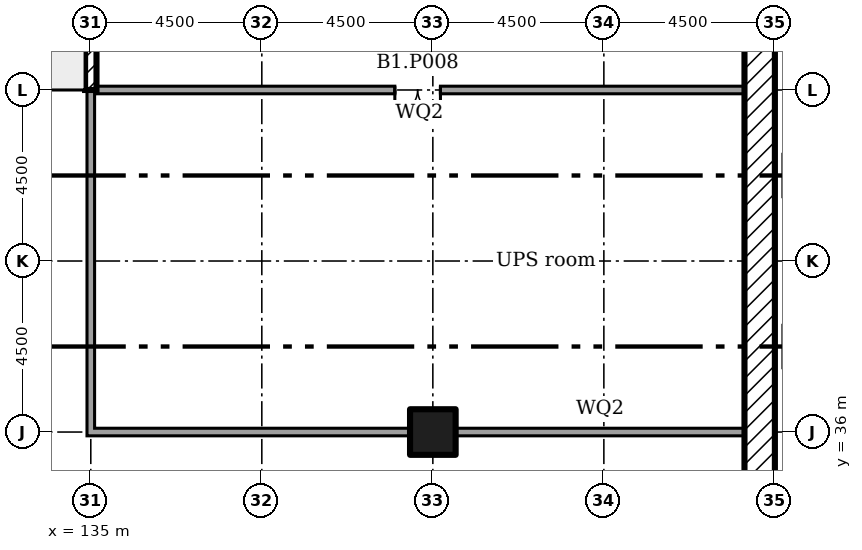
"""IFC4 building model, lengths in metres.
Left out: names, types, materials, properties, quantities, classifications, styles, units other than length and angle.
Written with IfcOpenShell. Run it as: python <this file> out.ifc"""

import sys

from ifc_helpers import new_model, si_unit, direction, frame, frame_2d, origin, origin_2d, place, context, subcontext, project, spatial, rectangle, extrude, element, fill, save


model = new_model("IFC4")
c1 = context("Model", 3, precision=1e-05, world=origin(), true_north=direction((0.0, 1.0)))
c2 = subcontext(c1, "Body", "Model", "MODEL_VIEW")
j1 = project(units=[si_unit("LENGTHUNIT", "METRE"), si_unit("PLANEANGLEUNIT", "RADIAN")], contexts=[c1])
p1 = place(None, origin())
s1 = spatial("IfcSite", under=j1, at=p1, CompositionType="ELEMENT")
p2 = place(p1, origin())
s2 = spatial("IfcBuilding", under=s1, at=p2, CompositionType="ELEMENT")
p3 = place(p2, frame((0.0, 0.0, -4.0)))
s3 = spatial("IfcBuildingStorey", under=s2, at=p3, CompositionType="ELEMENT", Elevation=-4.0)
p4 = place(p3, frame((144.0, 36.0, 0.0)))
e1 = element("IfcColumn", 1, at=p4, inside=s3, PredefinedType="COLUMN", context=c2, shape_type="SweptSolid", body=[
    extrude(rectangle(XDim=1.2, YDim=1.2, at=origin_2d()), origin(), (0.0, 0.0, 1.0), 4.0),
])
p5 = place(p3, frame((152.6, 0.8, 0.0), z_axis=(0.0, 0.0, 1.0), x_axis=(0.0, 1.0, 0.0)))
e2 = element("IfcWall", 2, at=p5, inside=s3, PredefinedType="SOLIDWALL", context=c2, shape_type="SweptSolid", body=[
    extrude(rectangle(XDim=97.4, YDim=0.8, at=frame_2d((48.7, 0.0))), origin(), (0.0, 0.0, 1.0), 4.0),
])
p6 = place(p3, frame((135.0, 35.9, 0.0), z_axis=(0.0, 0.0, 1.0), x_axis=(0.0, 1.0, 0.0)))
e3 = element("IfcWall", 3, at=p6, inside=s3, PredefinedType="SOLIDWALL", context=c2, shape_type="SweptSolid", body=[
    extrude(rectangle(XDim=9.2, YDim=0.2, at=frame_2d((4.6, 0.0))), origin(), (0.0, 0.0, 1.0), 3.55),
])
p7 = place(p3, frame((135.1, 36.0, 0.0)))
e4 = element("IfcWall", 4, at=p7, inside=s3, PredefinedType="SOLIDWALL", context=c2, shape_type="SweptSolid", body=[
    extrude(rectangle(XDim=8.305, YDim=0.2, at=frame_2d((4.152, 0.0))), origin(), (0.0, 0.0, 1.0), 3.55),
])
p8 = place(p3, frame((144.595, 36.0, 0.0)))
e5 = element("IfcWall", 5, at=p8, inside=s3, PredefinedType="SOLIDWALL", context=c2, shape_type="SweptSolid", body=[
    extrude(rectangle(XDim=7.605, YDim=0.2, at=frame_2d((3.802, 0.0))), origin(), (0.0, 0.0, 1.0), 3.55),
])
p9 = place(p3, frame((135.1, 45.0, 0.0)))
e6 = element("IfcWall", 6, at=p9, inside=s3, PredefinedType="SOLIDWALL", context=c2, shape_type="SweptSolid", body=[
    extrude(rectangle(XDim=17.1, YDim=0.2, at=frame_2d((8.55, 0.0))), origin(), (0.0, 0.0, 1.0), 3.55),
])
p10 = place(p9, frame((7.9, 0.0, 0.0)))
e7 = element("IfcOpeningElement", 7, at=p10, cuts=e6, PredefinedType="OPENING", context=c2, shape_type="SweptSolid", body=[
    extrude(rectangle(XDim=1.2, YDim=2.1, at=frame_2d((0.6, 1.05))), frame((0.0, 0.11, 0.0), z_axis=(0.0, -1.0, 0.0), x_axis=(1.0, 0.0, 0.0)), (0.0, 0.0, 1.0), 0.22),
])
p11 = place(p3, frame((135.0, 45.0, 0.0), z_axis=(0.0, 0.0, 1.0), x_axis=(0.0, 1.0, 0.0)))
e8 = element("IfcWall", 8, at=p11, inside=s3, PredefinedType="SOLIDWALL", context=c2, shape_type="SweptSolid", body=[
    extrude(rectangle(XDim=19.8, YDim=0.3, at=frame_2d((9.9, 0.0))), origin(), (0.0, 0.0, 1.0), 1.1),
])
p12 = place(p10, frame((1.2, 0.0, 0.0), x_axis=(-1.0, 0.0, 0.0)))
e9 = element("IfcDoor", 9, at=p12, inside=s3, OperationType="DOUBLE_DOOR_SINGLE_SWING", PredefinedType="DOOR", context=c2, shape_type="SweptSolid", body=[
    extrude(rectangle(XDim=1.2, YDim=2.1, at=frame_2d((0.6, 1.05))), frame((0.0, 0.025, 0.0), z_axis=(0.0, -1.0, 0.0), x_axis=(1.0, 0.0, 0.0)), (0.0, 0.0, 1.0), 0.05),
])
fill(e7, e9)
save(model, sys.argv[1])
